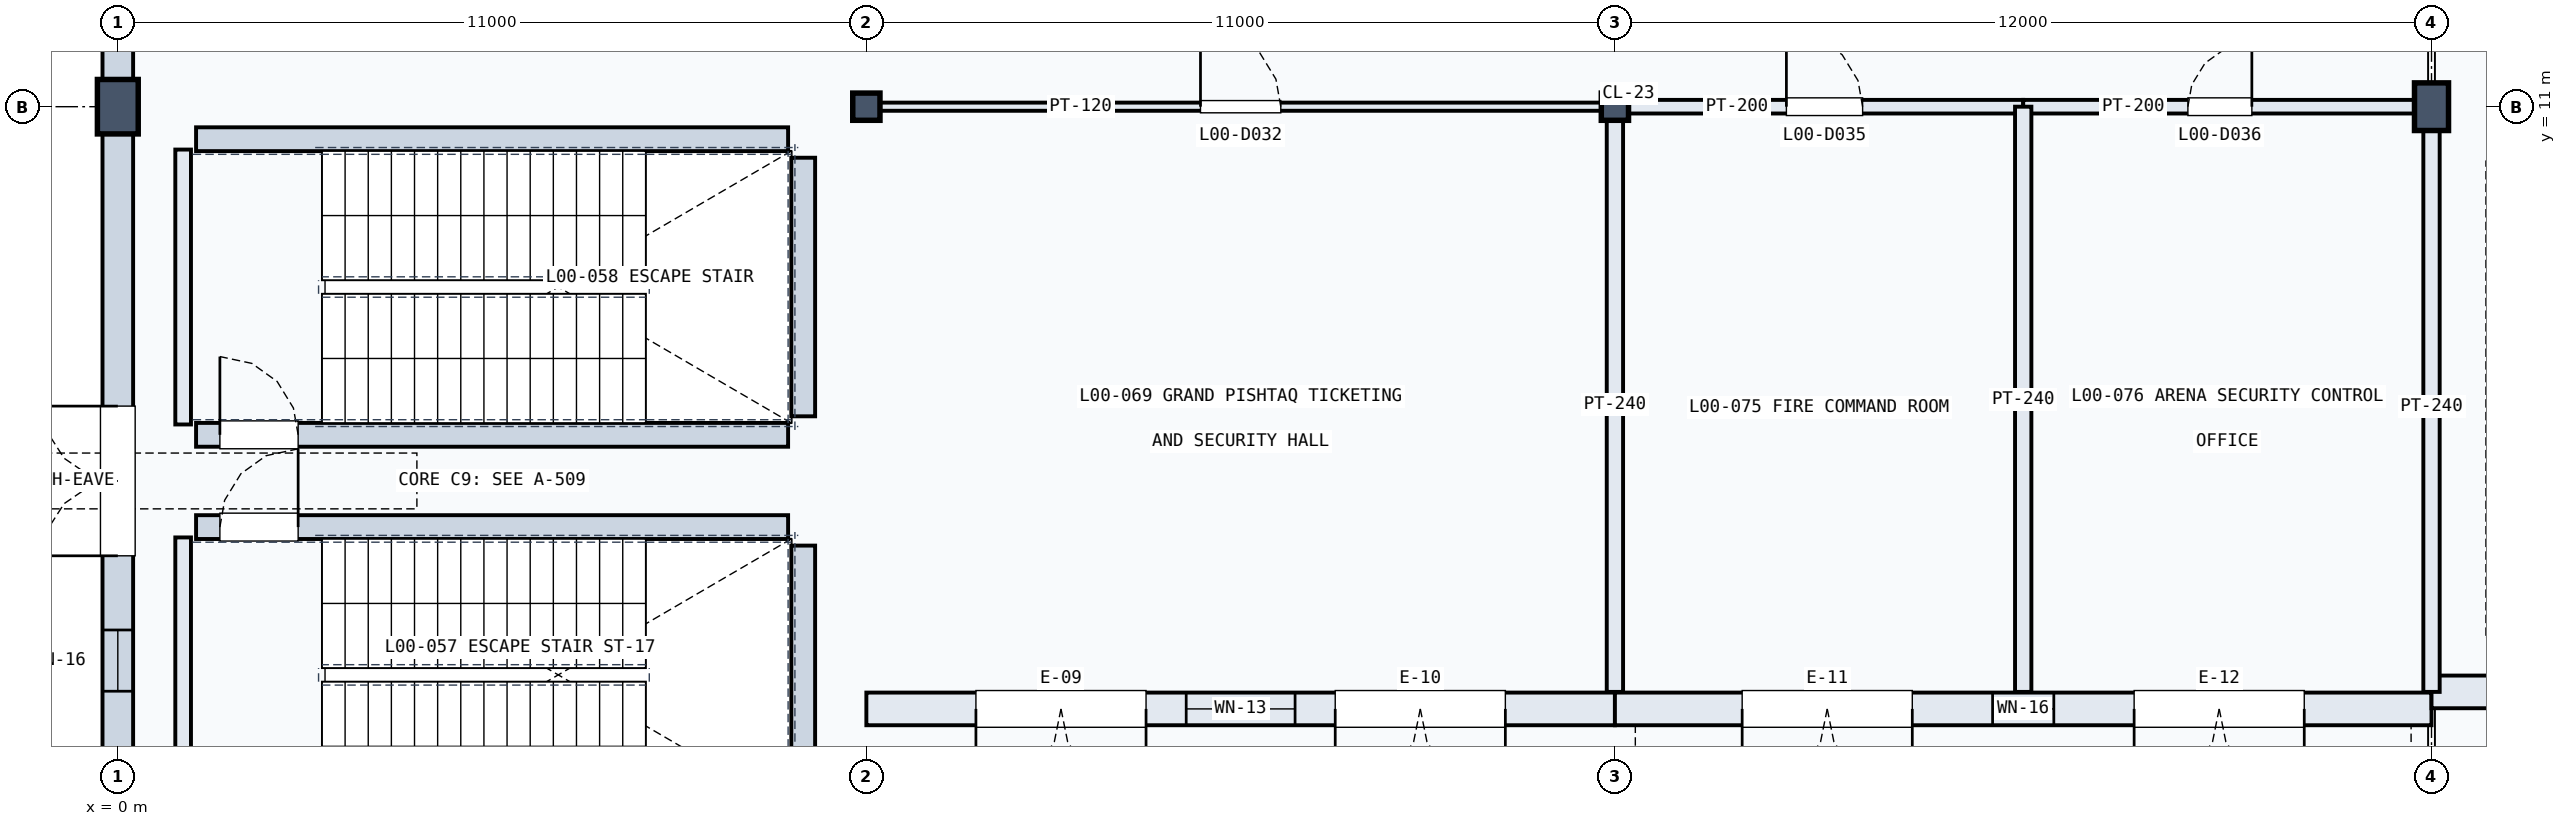
"""IFC4 building model, lengths in metres.
Left out: names, types, materials, properties, quantities, classifications, styles, units other than length and angle.
Written with IfcOpenShell. Run it as: python <this file> out.ifc"""

import sys

from ifc_helpers import new_model, si_unit, direction, frame, frame_2d, origin, origin_2d, place, context, subcontext, project, spatial, rectangle, hollow_rectangle, extrude, element, fill, save


model = new_model("IFC4")
c1 = context("Model", 3, precision=1e-05, world=origin(), true_north=direction((0.0, 1.0)))
c2 = subcontext(c1, "Body", "Model", "MODEL_VIEW")
j1 = project(units=[si_unit("LENGTHUNIT", "METRE"), si_unit("PLANEANGLEUNIT", "RADIAN")], contexts=[c1])
p1 = place(None, origin())
s1 = spatial("IfcSite", under=j1, at=p1, CompositionType="ELEMENT")
p2 = place(p1, origin())
s2 = spatial("IfcBuilding", under=s1, at=p2, CompositionType="ELEMENT")
p3 = place(p2, origin())
s3 = spatial("IfcBuildingStorey", under=s2, at=p3, CompositionType="ELEMENT", Elevation=0.0)
p4 = place(p3, frame((0.0, 11.0, 0.0), z_axis=(0.0, 0.0, 1.0), x_axis=(1.0, 0.0, 0.0)))
e1 = element("IfcColumn", 1, at=p4, inside=s3, PredefinedType="COLUMN", context=c2, shape_type="SweptSolid", body=[
    extrude(rectangle(XDim=0.6, YDim=0.8, at=origin_2d()), origin(), (0.0, 0.0, 1.0), 5.4),
])
for number, where, z_axis, x_axis in (
    (2, (11.0, 11.0, 0.0), (0.0, 0.0, 1.0), (1.0, 0.0, 0.0)),
    (3, (22.0, 11.0, 0.0), (0.0, 0.0, 1.0), (1.0, 0.0, 0.0)),
):
    element("IfcColumn", number, at=place(p3, frame(where, z_axis=z_axis, x_axis=x_axis)), inside=s3, PredefinedType="COLUMN", context=c2, shape_type="SweptSolid", body=[
        extrude(hollow_rectangle(XDim=0.4, YDim=0.4, WallThickness=0.02, at=origin_2d()), origin(), (0.0, 0.0, 1.0), 5.4),
    ])
p5 = place(p3, frame((34.0, 11.0, 0.0), z_axis=(0.0, 0.0, 1.0), x_axis=(1.0, 0.0, 0.0)))
e4 = element("IfcColumn", 4, at=p5, inside=s3, PredefinedType="COLUMN", context=c2, shape_type="SweptSolid", body=[
    extrude(rectangle(XDim=0.5, YDim=0.7, at=origin_2d()), origin(), (0.0, 0.0, 1.0), 5.4),
])
p6 = place(p3, frame((0.0, 0.22, 0.0), z_axis=(0.0, 0.0, 1.0), x_axis=(0.0, 1.0, 0.0)))
e5 = element("IfcWall", 5, at=p6, inside=s3, PredefinedType="SOLIDWALL", context=c2, shape_type="SweptSolid", body=[
    extrude(rectangle(XDim=10.56, YDim=0.45, at=frame_2d((5.28, 0.0))), origin(), (0.0, 0.0, 1.0), 4.3),
])
p7 = place(p6, frame((4.18, 0.0, 0.0)))
e6 = element("IfcOpeningElement", 6, at=p7, cuts=e5, PredefinedType="OPENING", context=c2, shape_type="SweptSolid", body=[
    extrude(rectangle(XDim=2.2, YDim=2.35, at=frame_2d((1.1, 1.175))), frame((0.0, 0.235, 0.0), z_axis=(0.0, -1.0, 0.0), x_axis=(1.0, 0.0, 0.0)), (0.0, 0.0, 1.0), 0.47),
])
p8 = place(p6, frame((2.19, 0.0, 0.8)))
e7 = element("IfcOpeningElement", 7, at=p8, cuts=e5, PredefinedType="OPENING", context=c2, shape_type="SweptSolid", body=[
    extrude(rectangle(XDim=0.9, YDim=1.8, at=frame_2d((0.45, 0.9))), frame((0.0, 0.235, 0.0), z_axis=(0.0, -1.0, 0.0), x_axis=(1.0, 0.0, 0.0)), (0.0, 0.0, 1.0), 0.47),
])
p9 = place(p3, frame((0.0, 11.22, 0.0), z_axis=(0.0, 0.0, 1.0), x_axis=(0.0, 1.0, 0.0)))
e8 = element("IfcWall", 8, at=p9, inside=s3, PredefinedType="SOLIDWALL", context=c2, shape_type="SweptSolid", body=[
    extrude(rectangle(XDim=10.56, YDim=0.45, at=frame_2d((5.28, 0.0))), origin(), (0.0, 0.0, 1.0), 4.3),
])
p10 = place(p9, frame((2.845, 0.0, 0.8)))
e9 = element("IfcOpeningElement", 9, at=p10, cuts=e8, PredefinedType="OPENING", context=c2, shape_type="SweptSolid", body=[
    extrude(rectangle(XDim=1.35, YDim=2.1, at=frame_2d((0.675, 1.05))), frame((0.0, 0.235, 0.0), z_axis=(0.0, -1.0, 0.0), x_axis=(1.0, 0.0, 0.0)), (0.0, 0.0, 1.0), 0.47),
])
p11 = place(p9, frame((6.365, 0.0, 0.8)))
e10 = element("IfcOpeningElement", 10, at=p11, cuts=e8, PredefinedType="OPENING", context=c2, shape_type="SweptSolid", body=[
    extrude(rectangle(XDim=1.35, YDim=2.1, at=frame_2d((0.675, 1.05))), frame((0.0, 0.235, 0.0), z_axis=(0.0, -1.0, 0.0), x_axis=(1.0, 0.0, 0.0)), (0.0, 0.0, 1.0), 0.47),
])
p12 = place(p3, frame((11.0, 2.15, 0.0), z_axis=(0.0, 0.0, 1.0), x_axis=(1.0, 0.0, 0.0)))
e11 = element("IfcWall", 11, at=p12, inside=s3, PredefinedType="SOLIDWALL", context=c2, shape_type="SweptSolid", body=[
    extrude(rectangle(XDim=11.0, YDim=0.48, at=frame_2d((5.5, 0.0))), origin(), (0.0, 0.0, 1.0), 4.35),
])
p13 = place(p12, frame((1.61, 0.0, 0.0)))
e12 = element("IfcOpeningElement", 12, at=p13, cuts=e11, PredefinedType="OPENING", context=c2, shape_type="SweptSolid", body=[
    extrude(rectangle(XDim=2.5, YDim=2.6, at=frame_2d((1.25, 1.3))), frame((0.0, 0.25, 0.0), z_axis=(0.0, -1.0, 0.0), x_axis=(1.0, 0.0, 0.0)), (0.0, 0.0, 1.0), 0.5),
])
p14 = place(p12, frame((6.89, 0.0, 0.0)))
e13 = element("IfcOpeningElement", 13, at=p14, cuts=e11, PredefinedType="OPENING", context=c2, shape_type="SweptSolid", body=[
    extrude(rectangle(XDim=2.5, YDim=2.6, at=frame_2d((1.25, 1.3))), frame((0.0, 0.25, 0.0), z_axis=(0.0, -1.0, 0.0), x_axis=(1.0, 0.0, 0.0)), (0.0, 0.0, 1.0), 0.5),
])
p15 = place(p12, frame((4.7, 0.0, 0.9)))
e14 = element("IfcOpeningElement", 14, at=p15, cuts=e11, PredefinedType="OPENING", context=c2, shape_type="SweptSolid", body=[
    extrude(rectangle(XDim=1.6, YDim=1.65, at=frame_2d((0.8, 0.825))), frame((0.0, 0.25, 0.0), z_axis=(0.0, -1.0, 0.0), x_axis=(1.0, 0.0, 0.0)), (0.0, 0.0, 1.0), 0.5),
])
p16 = place(p3, frame((22.0, 2.15, 0.0), z_axis=(0.0, 0.0, 1.0), x_axis=(1.0, 0.0, 0.0)))
e15 = element("IfcWall", 15, at=p16, inside=s3, PredefinedType="SOLIDWALL", context=c2, shape_type="SweptSolid", body=[
    extrude(rectangle(XDim=12.0, YDim=0.48, at=frame_2d((6.0, 0.0))), origin(), (0.0, 0.0, 1.0), 4.43),
])
p17 = place(p16, frame((1.87, 0.0, 0.0)))
e16 = element("IfcOpeningElement", 16, at=p17, cuts=e15, PredefinedType="OPENING", context=c2, shape_type="SweptSolid", body=[
    extrude(rectangle(XDim=2.5, YDim=2.6, at=frame_2d((1.25, 1.3))), frame((0.0, 0.25, 0.0), z_axis=(0.0, -1.0, 0.0), x_axis=(1.0, 0.0, 0.0)), (0.0, 0.0, 1.0), 0.5),
])
p18 = place(p16, frame((7.63, 0.0, 0.0)))
e17 = element("IfcOpeningElement", 17, at=p18, cuts=e15, PredefinedType="OPENING", context=c2, shape_type="SweptSolid", body=[
    extrude(rectangle(XDim=2.5, YDim=2.6, at=frame_2d((1.25, 1.3))), frame((0.0, 0.25, 0.0), z_axis=(0.0, -1.0, 0.0), x_axis=(1.0, 0.0, 0.0)), (0.0, 0.0, 1.0), 0.5),
])
p19 = place(p16, frame((5.55, 0.0, 0.9)))
e18 = element("IfcOpeningElement", 18, at=p19, cuts=e15, PredefinedType="OPENING", context=c2, shape_type="SweptSolid", body=[
    extrude(rectangle(XDim=0.9, YDim=1.8, at=frame_2d((0.45, 0.9))), frame((0.0, 0.25, 0.0), z_axis=(0.0, -1.0, 0.0), x_axis=(1.0, 0.0, 0.0)), (0.0, 0.0, 1.0), 0.5),
])
p20 = place(p3, frame((34.0, 2.4, 0.0), z_axis=(0.0, 0.0, 1.0), x_axis=(1.0, 0.0, 0.0)))
e19 = element("IfcWall", 19, at=p20, inside=s3, PredefinedType="SOLIDWALL", context=c2, shape_type="SweptSolid", body=[
    extrude(rectangle(XDim=12.0, YDim=0.48, at=frame_2d((6.0, 0.0))), origin(), (0.0, 0.0, 1.0), 4.1),
])
p21 = place(p20, frame((1.87, 0.0, 0.0)))
e20 = element("IfcOpeningElement", 20, at=p21, cuts=e19, PredefinedType="OPENING", context=c2, shape_type="SweptSolid", body=[
    extrude(rectangle(XDim=2.6, YDim=2.4, at=frame_2d((1.3, 1.2))), frame((0.0, 0.25, 0.0), z_axis=(0.0, -1.0, 0.0), x_axis=(1.0, 0.0, 0.0)), (0.0, 0.0, 1.0), 0.5),
])
p22 = place(p20, frame((7.63, 0.0, 0.0)))
e21 = element("IfcOpeningElement", 21, at=p22, cuts=e19, PredefinedType="OPENING", context=c2, shape_type="SweptSolid", body=[
    extrude(rectangle(XDim=2.6, YDim=2.4, at=frame_2d((1.3, 1.2))), frame((0.0, 0.25, 0.0), z_axis=(0.0, -1.0, 0.0), x_axis=(1.0, 0.0, 0.0)), (0.0, 0.0, 1.0), 0.5),
])
p23 = place(p20, frame((5.325, 0.0, 0.8)))
e22 = element("IfcOpeningElement", 22, at=p23, cuts=e19, PredefinedType="OPENING", context=c2, shape_type="SweptSolid", body=[
    extrude(rectangle(XDim=1.35, YDim=2.1, at=frame_2d((0.675, 1.05))), frame((0.0, 0.25, 0.0), z_axis=(0.0, -1.0, 0.0), x_axis=(1.0, 0.0, 0.0)), (0.0, 0.0, 1.0), 0.5),
])
p24 = place(p3, frame((0.96, 0.63, 0.0), z_axis=(0.0, 0.0, 1.0), x_axis=(0.0, 1.0, 0.0)))
e23 = element("IfcWall", 23, at=p24, inside=s3, PredefinedType="SOLIDWALL", context=c2, shape_type="SweptSolid", body=[
    extrude(rectangle(XDim=4.04, YDim=0.23, at=frame_2d((2.02, 0.0))), origin(), (0.0, 0.0, 1.0), 5.06),
])
p25 = place(p3, frame((10.072, 0.05, 0.0), z_axis=(0.0, 0.0, 1.0), x_axis=(0.0, 1.0, 0.0)))
e24 = element("IfcWall", 24, at=p25, inside=s3, PredefinedType="SOLIDWALL", context=c2, shape_type="SweptSolid", body=[
    extrude(rectangle(XDim=4.5, YDim=0.35, at=frame_2d((2.25, 0.0))), origin(), (0.0, 0.0, 1.0), 5.06),
])
p26 = place(p3, frame((1.15, 4.822, 0.0), z_axis=(0.0, 0.0, 1.0), x_axis=(1.0, 0.0, 0.0)))
e25 = element("IfcWall", 25, at=p26, inside=s3, PredefinedType="SOLIDWALL", context=c2, shape_type="SweptSolid", body=[
    extrude(rectangle(XDim=8.7, YDim=0.35, at=frame_2d((4.35, 0.0))), origin(), (0.0, 0.0, 1.0), 5.06),
])
p27 = place(p26, frame((0.35, 0.0, 0.0)))
e26 = element("IfcOpeningElement", 26, at=p27, cuts=e25, PredefinedType="OPENING", context=c2, shape_type="SweptSolid", body=[
    extrude(rectangle(XDim=1.15, YDim=2.2, at=frame_2d((0.575, 1.1))), frame((0.0, 0.185, 0.0), z_axis=(0.0, -1.0, 0.0), x_axis=(1.0, 0.0, 0.0)), (0.0, 0.0, 1.0), 0.37),
])
p28 = place(p3, frame((0.96, 6.33, 0.0), z_axis=(0.0, 0.0, 1.0), x_axis=(0.0, 1.0, 0.0)))
e27 = element("IfcWall", 27, at=p28, inside=s3, PredefinedType="SOLIDWALL", context=c2, shape_type="SweptSolid", body=[
    extrude(rectangle(XDim=4.04, YDim=0.23, at=frame_2d((2.02, 0.0))), origin(), (0.0, 0.0, 1.0), 5.06),
])
p29 = place(p3, frame((10.072, 6.45, 0.0), z_axis=(0.0, 0.0, 1.0), x_axis=(0.0, 1.0, 0.0)))
e28 = element("IfcWall", 28, at=p29, inside=s3, PredefinedType="SOLIDWALL", context=c2, shape_type="SweptSolid", body=[
    extrude(rectangle(XDim=3.8, YDim=0.35, at=frame_2d((1.9, 0.0))), origin(), (0.0, 0.0, 1.0), 5.06),
])
p30 = place(p3, frame((1.15, 6.178, 0.0), z_axis=(0.0, 0.0, 1.0), x_axis=(1.0, 0.0, 0.0)))
e29 = element("IfcWall", 29, at=p30, inside=s3, PredefinedType="SOLIDWALL", context=c2, shape_type="SweptSolid", body=[
    extrude(rectangle(XDim=8.7, YDim=0.35, at=frame_2d((4.35, 0.0))), origin(), (0.0, 0.0, 1.0), 5.06),
])
p31 = place(p30, frame((0.35, 0.0, 0.0)))
e30 = element("IfcOpeningElement", 30, at=p31, cuts=e29, PredefinedType="OPENING", context=c2, shape_type="SweptSolid", body=[
    extrude(rectangle(XDim=1.15, YDim=2.2, at=frame_2d((0.575, 1.1))), frame((0.0, 0.185, 0.0), z_axis=(0.0, -1.0, 0.0), x_axis=(1.0, 0.0, 0.0)), (0.0, 0.0, 1.0), 0.37),
])
p32 = place(p3, frame((1.15, 10.522, 0.0), z_axis=(0.0, 0.0, 1.0), x_axis=(1.0, 0.0, 0.0)))
e31 = element("IfcWall", 31, at=p32, inside=s3, PredefinedType="SOLIDWALL", context=c2, shape_type="SweptSolid", body=[
    extrude(rectangle(XDim=8.7, YDim=0.35, at=frame_2d((4.35, 0.0))), origin(), (0.0, 0.0, 1.0), 5.06),
])
p33 = place(p3, frame((11.16, 11.0, 0.0), z_axis=(0.0, 0.0, 1.0), x_axis=(1.0, 0.0, 0.0)))
e32 = element("IfcWall", 32, at=p33, inside=s3, PredefinedType="PARTITIONING", context=c2, shape_type="SweptSolid", body=[
    extrude(rectangle(XDim=10.68, YDim=0.12, at=frame_2d((5.34, 0.0))), origin(), (0.0, 0.0, 1.0), 4.3),
])
p34 = place(p33, frame((4.75, 0.0, 0.0)))
e33 = element("IfcOpeningElement", 33, at=p34, cuts=e32, PredefinedType="OPENING", context=c2, shape_type="SweptSolid", body=[
    extrude(rectangle(XDim=1.18, YDim=2.15, at=frame_2d((0.59, 1.075))), frame((0.0, 0.07, 0.0), z_axis=(0.0, -1.0, 0.0), x_axis=(1.0, 0.0, 0.0)), (0.0, 0.0, 1.0), 0.14),
])
p35 = place(p3, frame((22.16, 11.0, 0.0), z_axis=(0.0, 0.0, 1.0), x_axis=(1.0, 0.0, 0.0)))
e34 = element("IfcWall", 34, at=p35, inside=s3, PredefinedType="PARTITIONING", context=c2, shape_type="SweptSolid", body=[
    extrude(rectangle(XDim=5.84, YDim=0.2, at=frame_2d((2.92, 0.0))), origin(), (0.0, 0.0, 1.0), 4.43),
])
p36 = place(p35, frame((2.36, 0.0, 0.0)))
e35 = element("IfcOpeningElement", 35, at=p36, cuts=e34, PredefinedType="OPENING", context=c2, shape_type="SweptSolid", body=[
    extrude(rectangle(XDim=1.12, YDim=2.25, at=frame_2d((0.56, 1.125))), frame((0.0, 0.11, 0.0), z_axis=(0.0, -1.0, 0.0), x_axis=(1.0, 0.0, 0.0)), (0.0, 0.0, 1.0), 0.22),
])
p37 = place(p3, frame((28.0, 11.0, 0.0), z_axis=(0.0, 0.0, 1.0), x_axis=(1.0, 0.0, 0.0)))
e36 = element("IfcWall", 36, at=p37, inside=s3, PredefinedType="PARTITIONING", context=c2, shape_type="SweptSolid", body=[
    extrude(rectangle(XDim=5.78, YDim=0.2, at=frame_2d((2.89, 0.0))), origin(), (0.0, 0.0, 1.0), 4.366),
])
p38 = place(p37, frame((2.42, 0.0, 0.0)))
e37 = element("IfcOpeningElement", 37, at=p38, cuts=e36, PredefinedType="OPENING", context=c2, shape_type="SweptSolid", body=[
    extrude(rectangle(XDim=0.94, YDim=2.15, at=frame_2d((0.47, 1.075))), frame((0.0, 0.11, 0.0), z_axis=(0.0, -1.0, 0.0), x_axis=(1.0, 0.0, 0.0)), (0.0, 0.0, 1.0), 0.22),
])
p39 = place(p3, frame((22.0, 2.4, 0.0), z_axis=(0.0, 0.0, 1.0), x_axis=(0.0, 1.0, 0.0)))
e38 = element("IfcWall", 38, at=p39, inside=s3, PredefinedType="PARTITIONING", context=c2, shape_type="SweptSolid", body=[
    extrude(rectangle(XDim=8.44, YDim=0.24, at=frame_2d((4.22, 0.0))), origin(), (0.0, 0.0, 1.0), 4.43),
])
p40 = place(p3, frame((28.0, 2.4, 0.0), z_axis=(0.0, 0.0, 1.0), x_axis=(0.0, 1.0, 0.0)))
e39 = element("IfcWall", 39, at=p40, inside=s3, PredefinedType="PARTITIONING", context=c2, shape_type="SweptSolid", body=[
    extrude(rectangle(XDim=8.6, YDim=0.24, at=frame_2d((4.3, 0.0))), origin(), (0.0, 0.0, 1.0), 4.45),
])
p41 = place(p3, frame((34.0, 2.4, 0.0), z_axis=(0.0, 0.0, 1.0), x_axis=(0.0, 1.0, 0.0)))
e40 = element("IfcWall", 40, at=p41, inside=s3, PredefinedType="PARTITIONING", context=c2, shape_type="SweptSolid", body=[
    extrude(rectangle(XDim=8.38, YDim=0.24, at=frame_2d((4.19, 0.0))), origin(), (0.0, 0.0, 1.0), 4.366),
])
p42 = place(p13, frame((2.5, 0.0, 0.0), z_axis=(0.0, 0.0, 1.0), x_axis=(-1.0, 0.0, 0.0)))
e41 = element("IfcDoor", 41, at=p42, inside=s3, OperationType="DOUBLE_DOOR_SINGLE_SWING", PredefinedType="DOOR", context=c2, shape_type="SweptSolid", body=[
    extrude(rectangle(XDim=2.5, YDim=2.6, at=frame_2d((1.25, 1.3))), frame((0.0, 0.025, 0.0), z_axis=(0.0, -1.0, 0.0), x_axis=(1.0, 0.0, 0.0)), (0.0, 0.0, 1.0), 0.05),
])
fill(e12, e41)
p43 = place(p14, frame((2.5, 0.0, 0.0), z_axis=(0.0, 0.0, 1.0), x_axis=(-1.0, 0.0, 0.0)))
e42 = element("IfcDoor", 42, at=p43, inside=s3, OperationType="DOUBLE_DOOR_SINGLE_SWING", PredefinedType="DOOR", context=c2, shape_type="SweptSolid", body=[
    extrude(rectangle(XDim=2.5, YDim=2.6, at=frame_2d((1.25, 1.3))), frame((0.0, 0.025, 0.0), z_axis=(0.0, -1.0, 0.0), x_axis=(1.0, 0.0, 0.0)), (0.0, 0.0, 1.0), 0.05),
])
fill(e13, e42)
p44 = place(p17, frame((2.5, 0.0, 0.0), z_axis=(0.0, 0.0, 1.0), x_axis=(-1.0, 0.0, 0.0)))
e43 = element("IfcDoor", 43, at=p44, inside=s3, OperationType="DOUBLE_DOOR_SINGLE_SWING", PredefinedType="DOOR", context=c2, shape_type="SweptSolid", body=[
    extrude(rectangle(XDim=2.5, YDim=2.6, at=frame_2d((1.25, 1.3))), frame((0.0, 0.025, 0.0), z_axis=(0.0, -1.0, 0.0), x_axis=(1.0, 0.0, 0.0)), (0.0, 0.0, 1.0), 0.05),
])
fill(e16, e43)
p45 = place(p18, frame((2.5, 0.0, 0.0), z_axis=(0.0, 0.0, 1.0), x_axis=(-1.0, 0.0, 0.0)))
e44 = element("IfcDoor", 44, at=p45, inside=s3, OperationType="DOUBLE_DOOR_SINGLE_SWING", PredefinedType="DOOR", context=c2, shape_type="SweptSolid", body=[
    extrude(rectangle(XDim=2.5, YDim=2.6, at=frame_2d((1.25, 1.3))), frame((0.0, 0.025, 0.0), z_axis=(0.0, -1.0, 0.0), x_axis=(1.0, 0.0, 0.0)), (0.0, 0.0, 1.0), 0.05),
])
fill(e17, e44)
p46 = place(p7, origin())
e45 = element("IfcDoor", 45, at=p46, inside=s3, OperationType="DOUBLE_DOOR_SINGLE_SWING", PredefinedType="DOOR", context=c2, shape_type="SweptSolid", body=[
    extrude(rectangle(XDim=2.2, YDim=2.35, at=frame_2d((1.1, 1.175))), frame((0.0, 0.025, 0.0), z_axis=(0.0, -1.0, 0.0), x_axis=(1.0, 0.0, 0.0)), (0.0, 0.0, 1.0), 0.05),
])
fill(e6, e45)
p47 = place(p8, origin())
e46 = element("IfcWindow", 46, at=p47, inside=s3, PartitioningType="SINGLE_PANEL", PredefinedType="WINDOW", context=c2, shape_type="SweptSolid", body=[
    extrude(rectangle(XDim=0.9, YDim=1.8, at=frame_2d((0.45, 0.9))), frame((0.0, 0.03, 0.0), z_axis=(0.0, -1.0, 0.0), x_axis=(1.0, 0.0, 0.0)), (0.0, 0.0, 1.0), 0.06),
])
fill(e7, e46)
p48 = place(p15, origin())
e47 = element("IfcWindow", 47, at=p48, inside=s3, PartitioningType="SINGLE_PANEL", PredefinedType="WINDOW", context=c2, shape_type="SweptSolid", body=[
    extrude(rectangle(XDim=1.6, YDim=1.65, at=frame_2d((0.8, 0.825))), frame((0.0, 0.03, 0.0), z_axis=(0.0, -1.0, 0.0), x_axis=(1.0, 0.0, 0.0)), (0.0, 0.0, 1.0), 0.06),
])
fill(e14, e47)
p49 = place(p19, origin())
e48 = element("IfcWindow", 48, at=p49, inside=s3, PartitioningType="SINGLE_PANEL", PredefinedType="WINDOW", context=c2, shape_type="SweptSolid", body=[
    extrude(rectangle(XDim=0.9, YDim=1.8, at=frame_2d((0.45, 0.9))), frame((0.0, 0.03, 0.0), z_axis=(0.0, -1.0, 0.0), x_axis=(1.0, 0.0, 0.0)), (0.0, 0.0, 1.0), 0.06),
])
fill(e18, e48)
p50 = place(p27, origin())
e49 = element("IfcDoor", 49, at=p50, inside=s3, OperationType="SINGLE_SWING_RIGHT", PredefinedType="DOOR", context=c2, shape_type="SweptSolid", body=[
    extrude(rectangle(XDim=1.15, YDim=2.2, at=frame_2d((0.575, 1.1))), frame((0.0, 0.025, 0.0), z_axis=(0.0, -1.0, 0.0), x_axis=(1.0, 0.0, 0.0)), (0.0, 0.0, 1.0), 0.05),
])
fill(e26, e49)
p51 = place(p31, origin())
e50 = element("IfcDoor", 50, at=p51, inside=s3, OperationType="SINGLE_SWING_LEFT", PredefinedType="DOOR", context=c2, shape_type="SweptSolid", body=[
    extrude(rectangle(XDim=1.15, YDim=2.2, at=frame_2d((0.575, 1.1))), frame((0.0, 0.025, 0.0), z_axis=(0.0, -1.0, 0.0), x_axis=(1.0, 0.0, 0.0)), (0.0, 0.0, 1.0), 0.05),
])
fill(e30, e50)
p52 = place(p34, origin())
e51 = element("IfcDoor", 51, at=p52, inside=s3, OperationType="SINGLE_SWING_LEFT", PredefinedType="DOOR", context=c2, shape_type="SweptSolid", body=[
    extrude(rectangle(XDim=1.18, YDim=2.15, at=frame_2d((0.59, 1.075))), frame((0.0, 0.025, 0.0), z_axis=(0.0, -1.0, 0.0), x_axis=(1.0, 0.0, 0.0)), (0.0, 0.0, 1.0), 0.05),
])
fill(e33, e51)
p53 = place(p36, origin())
e52 = element("IfcDoor", 52, at=p53, inside=s3, OperationType="SINGLE_SWING_LEFT", PredefinedType="DOOR", context=c2, shape_type="SweptSolid", body=[
    extrude(rectangle(XDim=1.12, YDim=2.25, at=frame_2d((0.56, 1.125))), frame((0.0, 0.025, 0.0), z_axis=(0.0, -1.0, 0.0), x_axis=(1.0, 0.0, 0.0)), (0.0, 0.0, 1.0), 0.05),
])
fill(e35, e52)
p54 = place(p38, origin())
e53 = element("IfcDoor", 53, at=p54, inside=s3, OperationType="SINGLE_SWING_RIGHT", PredefinedType="DOOR", context=c2, shape_type="SweptSolid", body=[
    extrude(rectangle(XDim=0.94, YDim=2.15, at=frame_2d((0.47, 1.075))), frame((0.0, 0.025, 0.0), z_axis=(0.0, -1.0, 0.0), x_axis=(1.0, 0.0, 0.0)), (0.0, 0.0, 1.0), 0.05),
])
fill(e37, e53)
save(model, sys.argv[1])
